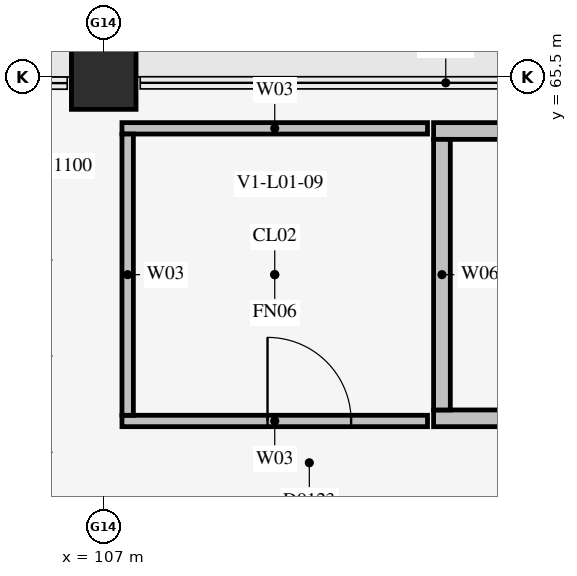
"""IFC4 building model, lengths in metres.
Left out: names, types, materials, properties, quantities, classifications, styles, units other than length and angle.
Written with IfcOpenShell. Run it as: python <this file> out.ifc"""

import sys

from ifc_helpers import new_model, si_unit, direction, frame, frame_2d, origin, origin_2d, place, context, subcontext, project, spatial, rectangle, extrude, element, fill, save


model = new_model("IFC4")
c1 = context("Model", 3, precision=1e-05, world=origin(), true_north=direction((0.0, 1.0)))
c2 = subcontext(c1, "Body", "Model", "MODEL_VIEW")
j1 = project(units=[si_unit("LENGTHUNIT", "METRE"), si_unit("PLANEANGLEUNIT", "RADIAN")], contexts=[c1])
p1 = place(None, origin())
s1 = spatial("IfcSite", under=j1, at=p1, CompositionType="ELEMENT")
p2 = place(p1, origin())
s2 = spatial("IfcBuilding", under=s1, at=p2, CompositionType="ELEMENT")
p3 = place(p2, frame((0.0, 0.0, 5.4)))
s3 = spatial("IfcBuildingStorey", under=s2, at=p3, CompositionType="ELEMENT", Elevation=5.4)
p4 = place(p3, frame((107.0, 65.5, 0.0), z_axis=(0.0, 0.0, 1.0), x_axis=(1.0, 0.0, 0.0)))
e1 = element("IfcColumn", 1, at=p4, inside=s3, PredefinedType="COLUMN", context=c2, shape_type="SweptSolid", body=[
    extrude(rectangle(XDim=0.85, YDim=0.85, at=origin_2d()), origin(), (0.0, 0.0, 1.0), 4.48),
])
p5 = place(p3, frame((107.24, 60.975, 0.0), z_axis=(0.0, 0.0, 1.0), x_axis=(1.0, 0.0, 0.0)))
e2 = element("IfcWall", 2, at=p5, inside=s3, PredefinedType="PARTITIONING", context=c2, shape_type="SweptSolid", body=[
    extrude(rectangle(XDim=4.02, YDim=0.15, at=frame_2d((2.01, 0.0))), origin(), (0.0, 0.0, 1.0), 4.465),
])
p6 = place(p5, frame((1.915, 0.0, 0.0)))
e3 = element("IfcOpeningElement", 3, at=p6, cuts=e2, PredefinedType="OPENING", context=c2, shape_type="SweptSolid", body=[
    extrude(rectangle(XDim=1.1, YDim=2.25, at=frame_2d((0.55, 1.125))), frame((0.0, 0.087, 0.0), z_axis=(0.0, -1.0, 0.0), x_axis=(1.0, 0.0, 0.0)), (0.0, 0.0, 1.0), 0.174),
])
p7 = place(p3, frame((107.24, 64.825, 0.0), z_axis=(0.0, 0.0, 1.0), x_axis=(1.0, 0.0, 0.0)))
e4 = element("IfcWall", 4, at=p7, inside=s3, PredefinedType="PARTITIONING", context=c2, shape_type="SweptSolid", body=[
    extrude(rectangle(XDim=4.02, YDim=0.15, at=frame_2d((2.01, 0.0))), origin(), (0.0, 0.0, 1.0), 4.465),
])
p8 = place(p3, frame((107.315, 61.05, 0.0), z_axis=(0.0, 0.0, 1.0), x_axis=(0.0, 1.0, 0.0)))
e5 = element("IfcWall", 5, at=p8, inside=s3, PredefinedType="PARTITIONING", context=c2, shape_type="SweptSolid", body=[
    extrude(rectangle(XDim=3.7, YDim=0.15, at=frame_2d((1.85, 0.0))), origin(), (0.0, 0.0, 1.0), 4.465),
])
p9 = place(p3, frame((111.34, 61.01, 0.0), z_axis=(0.0, 0.0, 1.0), x_axis=(1.0, 0.0, 0.0)))
e6 = element("IfcWall", 6, at=p9, inside=s3, PredefinedType="PLUMBINGWALL", context=c2, shape_type="SweptSolid", body=[
    extrude(rectangle(XDim=4.02, YDim=0.22, at=frame_2d((2.01, 0.0))), origin(), (0.0, 0.0, 1.0), 4.465),
])
p10 = place(p9, frame((1.018, 0.0, 0.0)))
e7 = element("IfcOpeningElement", 7, at=p10, cuts=e6, PredefinedType="OPENING", context=c2, shape_type="SweptSolid", body=[
    extrude(rectangle(XDim=1.05, YDim=2.15, at=frame_2d((0.525, 1.075))), frame((0.0, 0.122, 0.0), z_axis=(0.0, -1.0, 0.0), x_axis=(1.0, 0.0, 0.0)), (0.0, 0.0, 1.0), 0.244),
])
p11 = place(p3, frame((111.34, 64.79, 0.0), z_axis=(0.0, 0.0, 1.0), x_axis=(1.0, 0.0, 0.0)))
e8 = element("IfcWall", 8, at=p11, inside=s3, PredefinedType="PLUMBINGWALL", context=c2, shape_type="SweptSolid", body=[
    extrude(rectangle(XDim=4.02, YDim=0.22, at=frame_2d((2.01, 0.0))), origin(), (0.0, 0.0, 1.0), 4.465),
])
p12 = place(p3, frame((111.45, 61.12, 0.0), z_axis=(0.0, 0.0, 1.0), x_axis=(0.0, 1.0, 0.0)))
e9 = element("IfcWall", 9, at=p12, inside=s3, PredefinedType="PLUMBINGWALL", context=c2, shape_type="SweptSolid", body=[
    extrude(rectangle(XDim=3.56, YDim=0.22, at=frame_2d((1.78, 0.0))), origin(), (0.0, 0.0, 1.0), 4.465),
])
p13 = place(p6, origin())
e10 = element("IfcDoor", 10, at=p13, inside=s3, OperationType="SINGLE_SWING_LEFT", PredefinedType="DOOR", context=c2, shape_type="SweptSolid", body=[
    extrude(rectangle(XDim=1.1, YDim=2.25, at=frame_2d((0.55, 1.125))), frame((0.0, 0.025, 0.0), z_axis=(0.0, -1.0, 0.0), x_axis=(1.0, 0.0, 0.0)), (0.0, 0.0, 1.0), 0.05),
])
fill(e3, e10)
save(model, sys.argv[1])
